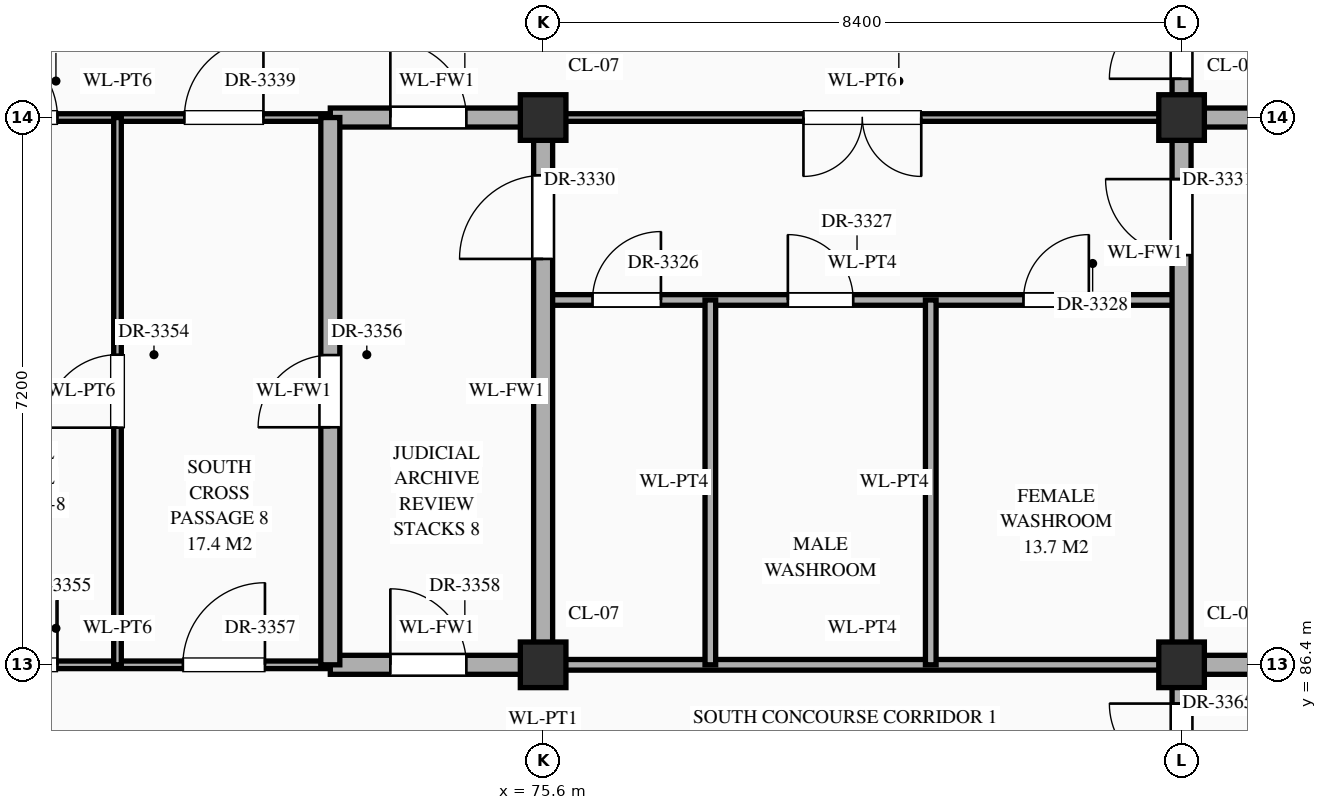
"""IFC4 building model, lengths in metres.
Left out: names, types, materials, properties, quantities, classifications, styles, units other than length and angle.
Written with IfcOpenShell. Run it as: python <this file> out.ifc"""

import sys

from ifc_helpers import new_model, si_unit, direction, frame, frame_2d, origin, origin_2d, place, context, subcontext, project, spatial, rectangle, extrude, element, fill, save


model = new_model("IFC4")
c1 = context("Model", 3, precision=1e-05, world=origin(), true_north=direction((0.0, 1.0)))
c2 = subcontext(c1, "Body", "Model", "MODEL_VIEW")
j1 = project(units=[si_unit("LENGTHUNIT", "METRE"), si_unit("PLANEANGLEUNIT", "RADIAN")], contexts=[c1])
p1 = place(None, origin())
s1 = spatial("IfcSite", under=j1, at=p1, CompositionType="ELEMENT")
p2 = place(p1, origin())
s2 = spatial("IfcBuilding", under=s1, at=p2, CompositionType="ELEMENT")
p3 = place(p2, frame((0.0, 0.0, 64.5)))
s3 = spatial("IfcBuildingStorey", under=s2, at=p3, CompositionType="ELEMENT", Elevation=64.5)
for number, where, z_axis, x_axis in (
    (1, (75.6, 86.4, 0.0), (0.0, 0.0, 1.0), (1.0, 0.0, 0.0)),
    (2, (75.6, 93.6, 0.0), (0.0, 0.0, 1.0), (1.0, 0.0, 0.0)),
    (3, (84.0, 86.4, 0.0), (0.0, 0.0, 1.0), (1.0, 0.0, 0.0)),
    (4, (84.0, 93.6, 0.0), (0.0, 0.0, 1.0), (1.0, 0.0, 0.0)),
):
    element("IfcColumn", number, at=place(p3, frame(where, z_axis=z_axis, x_axis=x_axis)), inside=s3, PredefinedType="COLUMN", context=c2, shape_type="SweptSolid", body=[
        extrude(rectangle(XDim=0.6, YDim=0.6, at=origin_2d()), origin(), (0.0, 0.0, 1.0), 4.2),
    ])
p4 = place(p3, frame((67.2, 86.4, 0.0), z_axis=(0.0, 0.0, 1.0), x_axis=(1.0, 0.0, 0.0)))
e5 = element("IfcWall", 5, at=p4, inside=s3, PredefinedType="STANDARD", context=c2, shape_type="SweptSolid", body=[
    extrude(rectangle(XDim=5.6, YDim=0.1, at=frame_2d((2.8, 0.0))), origin(), (0.0, 0.0, 1.0), 3.0),
])
p5 = place(p4, frame((1.01, 0.0, 0.0)))
e6 = element("IfcOpeningElement", 6, at=p5, cuts=e5, PredefinedType="OPENING", context=c2, shape_type="SweptSolid", body=[
    extrude(rectangle(XDim=1.0, YDim=2.25, at=frame_2d((0.5, 1.125))), frame((0.0, 0.062, 0.0), z_axis=(0.0, -1.0, 0.0), x_axis=(1.0, 0.0, 0.0)), (0.0, 0.0, 1.0), 0.124),
])
p6 = place(p4, frame((3.66, 0.0, 0.0)))
e7 = element("IfcOpeningElement", 7, at=p6, cuts=e5, PredefinedType="OPENING", context=c2, shape_type="SweptSolid", body=[
    extrude(rectangle(XDim=1.08, YDim=2.25, at=frame_2d((0.54, 1.125))), frame((0.0, 0.062, 0.0), z_axis=(0.0, -1.0, 0.0), x_axis=(1.0, 0.0, 0.0)), (0.0, 0.0, 1.0), 0.124),
])
p7 = place(p3, frame((72.8, 86.4, 0.0), z_axis=(0.0, 0.0, 1.0), x_axis=(1.0, 0.0, 0.0)))
e8 = element("IfcWall", 8, at=p7, inside=s3, PredefinedType="STANDARD", context=c2, shape_type="SweptSolid", body=[
    extrude(rectangle(XDim=2.8, YDim=0.25, at=frame_2d((1.4, 0.0))), origin(), (0.0, 0.0, 1.0), 3.0),
])
p8 = place(p7, frame((0.79, 0.0, 0.0)))
e9 = element("IfcOpeningElement", 9, at=p8, cuts=e8, PredefinedType="OPENING", context=c2, shape_type="SweptSolid", body=[
    extrude(rectangle(XDim=1.0, YDim=2.2, at=frame_2d((0.5, 1.1))), frame((0.0, 0.137, 0.0), z_axis=(0.0, -1.0, 0.0), x_axis=(1.0, 0.0, 0.0)), (0.0, 0.0, 1.0), 0.274),
])
p9 = place(p3, frame((75.6, 86.4, 0.0), z_axis=(0.0, 0.0, 1.0), x_axis=(1.0, 0.0, 0.0)))
e10 = element("IfcWall", 10, at=p9, inside=s3, PredefinedType="STANDARD", context=c2, shape_type="SweptSolid", body=[
    extrude(rectangle(XDim=8.4, YDim=0.14, at=frame_2d((4.2, 0.0))), origin(), (0.0, 0.0, 1.0), 3.0),
])
p10 = place(p3, frame((84.0, 86.4, 0.0), z_axis=(0.0, 0.0, 1.0), x_axis=(1.0, 0.0, 0.0)))
e11 = element("IfcWall", 11, at=p10, inside=s3, PredefinedType="STANDARD", context=c2, shape_type="SweptSolid", body=[
    extrude(rectangle(XDim=8.4, YDim=0.25, at=frame_2d((4.2, 0.0))), origin(), (0.0, 0.0, 1.0), 3.0),
])
p11 = place(p10, frame((3.725, 0.0, 0.0)))
e12 = element("IfcOpeningElement", 12, at=p11, cuts=e11, PredefinedType="OPENING", context=c2, shape_type="SweptSolid", body=[
    extrude(rectangle(XDim=0.95, YDim=2.15, at=frame_2d((0.475, 1.075))), frame((0.0, 0.137, 0.0), z_axis=(0.0, -1.0, 0.0), x_axis=(1.0, 0.0, 0.0)), (0.0, 0.0, 1.0), 0.274),
])
p12 = place(p3, frame((75.6, 91.2, 0.0), z_axis=(0.0, 0.0, 1.0), x_axis=(1.0, 0.0, 0.0)))
e13 = element("IfcWall", 13, at=p12, inside=s3, PredefinedType="STANDARD", context=c2, shape_type="SweptSolid", body=[
    extrude(rectangle(XDim=8.4, YDim=0.14, at=frame_2d((4.2, 0.0))), origin(), (0.0, 0.0, 1.0), 3.95),
])
p13 = place(p12, frame((0.65, 0.0, 0.0)))
e14 = element("IfcOpeningElement", 14, at=p13, cuts=e13, PredefinedType="OPENING", context=c2, shape_type="SweptSolid", body=[
    extrude(rectangle(XDim=0.9, YDim=2.15, at=frame_2d((0.45, 1.075))), frame((0.0, 0.082, 0.0), z_axis=(0.0, -1.0, 0.0), x_axis=(1.0, 0.0, 0.0)), (0.0, 0.0, 1.0), 0.164),
])
p14 = place(p12, frame((3.22, 0.0, 0.0)))
e15 = element("IfcOpeningElement", 15, at=p14, cuts=e13, PredefinedType="OPENING", context=c2, shape_type="SweptSolid", body=[
    extrude(rectangle(XDim=0.86, YDim=2.1, at=frame_2d((0.43, 1.05))), frame((0.0, 0.082, 0.0), z_axis=(0.0, -1.0, 0.0), x_axis=(1.0, 0.0, 0.0)), (0.0, 0.0, 1.0), 0.164),
])
p15 = place(p12, frame((6.32, 0.0, 0.0)))
e16 = element("IfcOpeningElement", 16, at=p15, cuts=e13, PredefinedType="OPENING", context=c2, shape_type="SweptSolid", body=[
    extrude(rectangle(XDim=0.86, YDim=2.1, at=frame_2d((0.43, 1.05))), frame((0.0, 0.082, 0.0), z_axis=(0.0, -1.0, 0.0), x_axis=(1.0, 0.0, 0.0)), (0.0, 0.0, 1.0), 0.164),
])
p16 = place(p3, frame((67.2, 93.6, 0.0), z_axis=(0.0, 0.0, 1.0), x_axis=(1.0, 0.0, 0.0)))
e17 = element("IfcWall", 17, at=p16, inside=s3, PredefinedType="STANDARD", context=c2, shape_type="SweptSolid", body=[
    extrude(rectangle(XDim=5.6, YDim=0.1, at=frame_2d((2.8, 0.0))), origin(), (0.0, 0.0, 1.0), 3.1),
])
p17 = place(p16, frame((1.01, 0.0, 0.0)))
e18 = element("IfcOpeningElement", 18, at=p17, cuts=e17, PredefinedType="OPENING", context=c2, shape_type="SweptSolid", body=[
    extrude(rectangle(XDim=1.0, YDim=2.25, at=frame_2d((0.5, 1.125))), frame((0.0, 0.062, 0.0), z_axis=(0.0, -1.0, 0.0), x_axis=(1.0, 0.0, 0.0)), (0.0, 0.0, 1.0), 0.124),
])
p18 = place(p16, frame((3.68, 0.0, 0.0)))
e19 = element("IfcOpeningElement", 19, at=p18, cuts=e17, PredefinedType="OPENING", context=c2, shape_type="SweptSolid", body=[
    extrude(rectangle(XDim=1.04, YDim=2.2, at=frame_2d((0.52, 1.1))), frame((0.0, 0.062, 0.0), z_axis=(0.0, -1.0, 0.0), x_axis=(1.0, 0.0, 0.0)), (0.0, 0.0, 1.0), 0.124),
])
p19 = place(p3, frame((72.8, 93.6, 0.0), z_axis=(0.0, 0.0, 1.0), x_axis=(1.0, 0.0, 0.0)))
e20 = element("IfcWall", 20, at=p19, inside=s3, PredefinedType="STANDARD", context=c2, shape_type="SweptSolid", body=[
    extrude(rectangle(XDim=2.8, YDim=0.25, at=frame_2d((1.4, 0.0))), origin(), (0.0, 0.0, 1.0), 3.1),
])
p20 = place(p19, frame((0.79, 0.0, 0.0)))
e21 = element("IfcOpeningElement", 21, at=p20, cuts=e20, PredefinedType="OPENING", context=c2, shape_type="SweptSolid", body=[
    extrude(rectangle(XDim=1.0, YDim=2.2, at=frame_2d((0.5, 1.1))), frame((0.0, 0.137, 0.0), z_axis=(0.0, -1.0, 0.0), x_axis=(1.0, 0.0, 0.0)), (0.0, 0.0, 1.0), 0.274),
])
p21 = place(p3, frame((75.6, 93.6, 0.0), z_axis=(0.0, 0.0, 1.0), x_axis=(1.0, 0.0, 0.0)))
e22 = element("IfcWall", 22, at=p21, inside=s3, PredefinedType="STANDARD", context=c2, shape_type="SweptSolid", body=[
    extrude(rectangle(XDim=8.4, YDim=0.1, at=frame_2d((4.2, 0.0))), origin(), (0.0, 0.0, 1.0), 3.1),
])
p22 = place(p21, frame((3.425, 0.0, 0.0)))
e23 = element("IfcOpeningElement", 23, at=p22, cuts=e22, PredefinedType="OPENING", context=c2, shape_type="SweptSolid", body=[
    extrude(rectangle(XDim=1.55, YDim=2.35, at=frame_2d((0.775, 1.175))), frame((0.0, 0.062, 0.0), z_axis=(0.0, -1.0, 0.0), x_axis=(1.0, 0.0, 0.0)), (0.0, 0.0, 1.0), 0.124),
])
p23 = place(p3, frame((84.0, 93.6, 0.0), z_axis=(0.0, 0.0, 1.0), x_axis=(1.0, 0.0, 0.0)))
e24 = element("IfcWall", 24, at=p23, inside=s3, PredefinedType="STANDARD", context=c2, shape_type="SweptSolid", body=[
    extrude(rectangle(XDim=8.4, YDim=0.25, at=frame_2d((4.2, 0.0))), origin(), (0.0, 0.0, 1.0), 3.1),
])
p24 = place(p23, frame((3.7, 0.0, 0.0)))
e25 = element("IfcOpeningElement", 25, at=p24, cuts=e24, PredefinedType="OPENING", context=c2, shape_type="SweptSolid", body=[
    extrude(rectangle(XDim=1.0, YDim=2.2, at=frame_2d((0.5, 1.1))), frame((0.0, 0.137, 0.0), z_axis=(0.0, -1.0, 0.0), x_axis=(1.0, 0.0, 0.0)), (0.0, 0.0, 1.0), 0.274),
])
p25 = place(p3, frame((70.0, 86.4, 0.0), z_axis=(0.0, 0.0, 1.0), x_axis=(0.0, 1.0, 0.0)))
e26 = element("IfcWall", 26, at=p25, inside=s3, PredefinedType="STANDARD", context=c2, shape_type="SweptSolid", body=[
    extrude(rectangle(XDim=7.2, YDim=0.1, at=frame_2d((3.6, 0.0))), origin(), (0.0, 0.0, 1.0), 3.95),
])
p26 = place(p25, frame((3.12, 0.0, 0.0)))
e27 = element("IfcOpeningElement", 27, at=p26, cuts=e26, PredefinedType="OPENING", context=c2, shape_type="SweptSolid", body=[
    extrude(rectangle(XDim=0.96, YDim=2.2, at=frame_2d((0.48, 1.1))), frame((0.0, 0.062, 0.0), z_axis=(0.0, -1.0, 0.0), x_axis=(1.0, 0.0, 0.0)), (0.0, 0.0, 1.0), 0.124),
])
p27 = place(p3, frame((72.8, 86.4, 0.0), z_axis=(0.0, 0.0, 1.0), x_axis=(0.0, 1.0, 0.0)))
e28 = element("IfcWall", 28, at=p27, inside=s3, PredefinedType="STANDARD", context=c2, shape_type="SweptSolid", body=[
    extrude(rectangle(XDim=7.2, YDim=0.25, at=frame_2d((3.6, 0.0))), origin(), (0.0, 0.0, 1.0), 3.95),
])
p28 = place(p27, frame((3.125, 0.0, 0.0)))
e29 = element("IfcOpeningElement", 29, at=p28, cuts=e28, PredefinedType="OPENING", context=c2, shape_type="SweptSolid", body=[
    extrude(rectangle(XDim=0.95, YDim=2.15, at=frame_2d((0.475, 1.075))), frame((0.0, 0.137, 0.0), z_axis=(0.0, -1.0, 0.0), x_axis=(1.0, 0.0, 0.0)), (0.0, 0.0, 1.0), 0.274),
])
p29 = place(p3, frame((75.6, 86.4, 0.0), z_axis=(0.0, 0.0, 1.0), x_axis=(0.0, 1.0, 0.0)))
e30 = element("IfcWall", 30, at=p29, inside=s3, PredefinedType="STANDARD", context=c2, shape_type="SweptSolid", body=[
    extrude(rectangle(XDim=7.2, YDim=0.25, at=frame_2d((3.6, 0.0))), origin(), (0.0, 0.0, 1.0), 3.2),
])
p30 = place(p29, frame((5.34, 0.0, 0.0)))
e31 = element("IfcOpeningElement", 31, at=p30, cuts=e30, PredefinedType="OPENING", context=c2, shape_type="SweptSolid", body=[
    extrude(rectangle(XDim=1.1, YDim=2.2, at=frame_2d((0.55, 1.1))), frame((0.0, 0.137, 0.0), z_axis=(0.0, -1.0, 0.0), x_axis=(1.0, 0.0, 0.0)), (0.0, 0.0, 1.0), 0.274),
])
for number, where, z_axis, x_axis in (
    (32, (77.8, 86.4, 0.0), (0.0, 0.0, 1.0), (0.0, 1.0, 0.0)),
    (33, (80.7, 86.4, 0.0), (0.0, 0.0, 1.0), (0.0, 1.0, 0.0)),
):
    element("IfcWall", number, at=place(p3, frame(where, z_axis=z_axis, x_axis=x_axis)), inside=s3, PredefinedType="STANDARD", context=c2, shape_type="SweptSolid", body=[
        extrude(rectangle(XDim=4.8, YDim=0.14, at=frame_2d((2.4, 0.0))), origin(), (0.0, 0.0, 1.0), 3.95),
    ])
p31 = place(p3, frame((84.0, 79.24, 0.0), z_axis=(0.0, 0.0, 1.0), x_axis=(0.0, 1.0, 0.0)))
e34 = element("IfcWall", 34, at=p31, inside=s3, PredefinedType="STANDARD", context=c2, shape_type="SweptSolid", body=[
    extrude(rectangle(XDim=25.16, YDim=0.25, at=frame_2d((12.58, 0.0))), origin(), (0.0, 0.0, 1.0), 3.1),
])
p32 = place(p31, frame((22.72, 0.0, 0.0)))
e35 = element("IfcOpeningElement", 35, at=p32, cuts=e34, PredefinedType="OPENING", context=c2, shape_type="SweptSolid", body=[
    extrude(rectangle(XDim=1.5, YDim=2.25, at=frame_2d((0.75, 1.125))), frame((0.0, 0.137, 0.0), z_axis=(0.0, -1.0, 0.0), x_axis=(1.0, 0.0, 0.0)), (0.0, 0.0, 1.0), 0.274),
])
p33 = place(p31, frame((12.55, 0.0, 0.0)))
e36 = element("IfcOpeningElement", 36, at=p33, cuts=e34, PredefinedType="OPENING", context=c2, shape_type="SweptSolid", body=[
    extrude(rectangle(XDim=1.0, YDim=2.2, at=frame_2d((0.5, 1.1))), frame((0.0, 0.137, 0.0), z_axis=(0.0, -1.0, 0.0), x_axis=(1.0, 0.0, 0.0)), (0.0, 0.0, 1.0), 0.274),
])
p34 = place(p31, frame((14.87, 0.0, 0.0)))
e37 = element("IfcOpeningElement", 37, at=p34, cuts=e34, PredefinedType="OPENING", context=c2, shape_type="SweptSolid", body=[
    extrude(rectangle(XDim=0.95, YDim=2.15, at=frame_2d((0.475, 1.075))), frame((0.0, 0.137, 0.0), z_axis=(0.0, -1.0, 0.0), x_axis=(1.0, 0.0, 0.0)), (0.0, 0.0, 1.0), 0.274),
])
p35 = place(p31, frame((5.7, 0.0, 0.0)))
e38 = element("IfcOpeningElement", 38, at=p35, cuts=e34, PredefinedType="OPENING", context=c2, shape_type="SweptSolid", body=[
    extrude(rectangle(XDim=0.95, YDim=2.15, at=frame_2d((0.475, 1.075))), frame((0.0, 0.137, 0.0), z_axis=(0.0, -1.0, 0.0), x_axis=(1.0, 0.0, 0.0)), (0.0, 0.0, 1.0), 0.274),
])
p36 = place(p13, origin())
e39 = element("IfcDoor", 39, at=p36, inside=s3, OperationType="SINGLE_SWING_RIGHT", PredefinedType="DOOR", context=c2, shape_type="SweptSolid", body=[
    extrude(rectangle(XDim=0.9, YDim=2.15, at=frame_2d((0.45, 1.075))), frame((0.0, 0.025, 0.0), z_axis=(0.0, -1.0, 0.0), x_axis=(1.0, 0.0, 0.0)), (0.0, 0.0, 1.0), 0.05),
])
fill(e14, e39)
p37 = place(p14, origin())
e40 = element("IfcDoor", 40, at=p37, inside=s3, OperationType="SINGLE_SWING_LEFT", PredefinedType="DOOR", context=c2, shape_type="SweptSolid", body=[
    extrude(rectangle(XDim=0.86, YDim=2.1, at=frame_2d((0.43, 1.05))), frame((0.0, 0.025, 0.0), z_axis=(0.0, -1.0, 0.0), x_axis=(1.0, 0.0, 0.0)), (0.0, 0.0, 1.0), 0.05),
])
fill(e15, e40)
p38 = place(p15, origin())
e41 = element("IfcDoor", 41, at=p38, inside=s3, OperationType="SINGLE_SWING_RIGHT", PredefinedType="DOOR", context=c2, shape_type="SweptSolid", body=[
    extrude(rectangle(XDim=0.86, YDim=2.1, at=frame_2d((0.43, 1.05))), frame((0.0, 0.025, 0.0), z_axis=(0.0, -1.0, 0.0), x_axis=(1.0, 0.0, 0.0)), (0.0, 0.0, 1.0), 0.05),
])
fill(e16, e41)
p39 = place(p22, frame((1.55, 0.0, 0.0), z_axis=(0.0, 0.0, 1.0), x_axis=(-1.0, 0.0, 0.0)))
e42 = element("IfcDoor", 42, at=p39, inside=s3, OperationType="DOUBLE_DOOR_SINGLE_SWING", PredefinedType="DOOR", context=c2, shape_type="SweptSolid", body=[
    extrude(rectangle(XDim=1.55, YDim=2.35, at=frame_2d((0.775, 1.175))), frame((0.0, 0.025, 0.0), z_axis=(0.0, -1.0, 0.0), x_axis=(1.0, 0.0, 0.0)), (0.0, 0.0, 1.0), 0.05),
])
fill(e23, e42)
p40 = place(p30, origin())
e43 = element("IfcDoor", 43, at=p40, inside=s3, OperationType="SINGLE_SWING_LEFT", PredefinedType="DOOR", context=c2, shape_type="SweptSolid", body=[
    extrude(rectangle(XDim=1.1, YDim=2.2, at=frame_2d((0.55, 1.1))), frame((0.0, 0.025, 0.0), z_axis=(0.0, -1.0, 0.0), x_axis=(1.0, 0.0, 0.0)), (0.0, 0.0, 1.0), 0.05),
])
fill(e31, e43)
p41 = place(p33, origin())
e44 = element("IfcDoor", 44, at=p41, inside=s3, OperationType="SINGLE_SWING_RIGHT", PredefinedType="DOOR", context=c2, shape_type="SweptSolid", body=[
    extrude(rectangle(XDim=1.0, YDim=2.2, at=frame_2d((0.5, 1.1))), frame((0.0, 0.025, 0.0), z_axis=(0.0, -1.0, 0.0), x_axis=(1.0, 0.0, 0.0)), (0.0, 0.0, 1.0), 0.05),
])
fill(e36, e44)
p42 = place(p34, origin())
e45 = element("IfcDoor", 45, at=p42, inside=s3, OperationType="SINGLE_SWING_LEFT", PredefinedType="DOOR", context=c2, shape_type="SweptSolid", body=[
    extrude(rectangle(XDim=0.95, YDim=2.15, at=frame_2d((0.475, 1.075))), frame((0.0, 0.025, 0.0), z_axis=(0.0, -1.0, 0.0), x_axis=(1.0, 0.0, 0.0)), (0.0, 0.0, 1.0), 0.05),
])
fill(e37, e45)
p43 = place(p17, origin())
e46 = element("IfcDoor", 46, at=p43, inside=s3, OperationType="SINGLE_SWING_LEFT", PredefinedType="DOOR", context=c2, shape_type="SweptSolid", body=[
    extrude(rectangle(XDim=1.0, YDim=2.25, at=frame_2d((0.5, 1.125))), frame((0.0, 0.025, 0.0), z_axis=(0.0, -1.0, 0.0), x_axis=(1.0, 0.0, 0.0)), (0.0, 0.0, 1.0), 0.05),
])
fill(e18, e46)
p44 = place(p18, origin())
e47 = element("IfcDoor", 47, at=p44, inside=s3, OperationType="SINGLE_SWING_RIGHT", PredefinedType="DOOR", context=c2, shape_type="SweptSolid", body=[
    extrude(rectangle(XDim=1.04, YDim=2.2, at=frame_2d((0.52, 1.1))), frame((0.0, 0.025, 0.0), z_axis=(0.0, -1.0, 0.0), x_axis=(1.0, 0.0, 0.0)), (0.0, 0.0, 1.0), 0.05),
])
fill(e19, e47)
p45 = place(p20, origin())
e48 = element("IfcDoor", 48, at=p45, inside=s3, OperationType="SINGLE_SWING_LEFT", PredefinedType="DOOR", context=c2, shape_type="SweptSolid", body=[
    extrude(rectangle(XDim=1.0, YDim=2.2, at=frame_2d((0.5, 1.1))), frame((0.0, 0.025, 0.0), z_axis=(0.0, -1.0, 0.0), x_axis=(1.0, 0.0, 0.0)), (0.0, 0.0, 1.0), 0.05),
])
fill(e21, e48)
p46 = place(p26, origin())
e49 = element("IfcDoor", 49, at=p46, inside=s3, OperationType="SINGLE_SWING_LEFT", PredefinedType="DOOR", context=c2, shape_type="SweptSolid", body=[
    extrude(rectangle(XDim=0.96, YDim=2.2, at=frame_2d((0.48, 1.1))), frame((0.0, 0.025, 0.0), z_axis=(0.0, -1.0, 0.0), x_axis=(1.0, 0.0, 0.0)), (0.0, 0.0, 1.0), 0.05),
])
fill(e27, e49)
p47 = place(p5, origin())
e50 = element("IfcDoor", 50, at=p47, inside=s3, OperationType="SINGLE_SWING_RIGHT", PredefinedType="DOOR", context=c2, shape_type="SweptSolid", body=[
    extrude(rectangle(XDim=1.0, YDim=2.25, at=frame_2d((0.5, 1.125))), frame((0.0, 0.025, 0.0), z_axis=(0.0, -1.0, 0.0), x_axis=(1.0, 0.0, 0.0)), (0.0, 0.0, 1.0), 0.05),
])
fill(e6, e50)
p48 = place(p28, origin())
e51 = element("IfcDoor", 51, at=p48, inside=s3, OperationType="SINGLE_SWING_LEFT", PredefinedType="DOOR", context=c2, shape_type="SweptSolid", body=[
    extrude(rectangle(XDim=0.95, YDim=2.15, at=frame_2d((0.475, 1.075))), frame((0.0, 0.025, 0.0), z_axis=(0.0, -1.0, 0.0), x_axis=(1.0, 0.0, 0.0)), (0.0, 0.0, 1.0), 0.05),
])
fill(e29, e51)
p49 = place(p6, origin())
e52 = element("IfcDoor", 52, at=p49, inside=s3, OperationType="SINGLE_SWING_RIGHT", PredefinedType="DOOR", context=c2, shape_type="SweptSolid", body=[
    extrude(rectangle(XDim=1.08, YDim=2.25, at=frame_2d((0.54, 1.125))), frame((0.0, 0.025, 0.0), z_axis=(0.0, -1.0, 0.0), x_axis=(1.0, 0.0, 0.0)), (0.0, 0.0, 1.0), 0.05),
])
fill(e7, e52)
p50 = place(p8, origin())
e53 = element("IfcDoor", 53, at=p50, inside=s3, OperationType="SINGLE_SWING_LEFT", PredefinedType="DOOR", context=c2, shape_type="SweptSolid", body=[
    extrude(rectangle(XDim=1.0, YDim=2.2, at=frame_2d((0.5, 1.1))), frame((0.0, 0.025, 0.0), z_axis=(0.0, -1.0, 0.0), x_axis=(1.0, 0.0, 0.0)), (0.0, 0.0, 1.0), 0.05),
])
fill(e9, e53)
p51 = place(p35, origin())
e54 = element("IfcDoor", 54, at=p51, inside=s3, OperationType="SINGLE_SWING_RIGHT", PredefinedType="DOOR", context=c2, shape_type="SweptSolid", body=[
    extrude(rectangle(XDim=0.95, YDim=2.15, at=frame_2d((0.475, 1.075))), frame((0.0, 0.025, 0.0), z_axis=(0.0, -1.0, 0.0), x_axis=(1.0, 0.0, 0.0)), (0.0, 0.0, 1.0), 0.05),
])
fill(e38, e54)
save(model, sys.argv[1])
